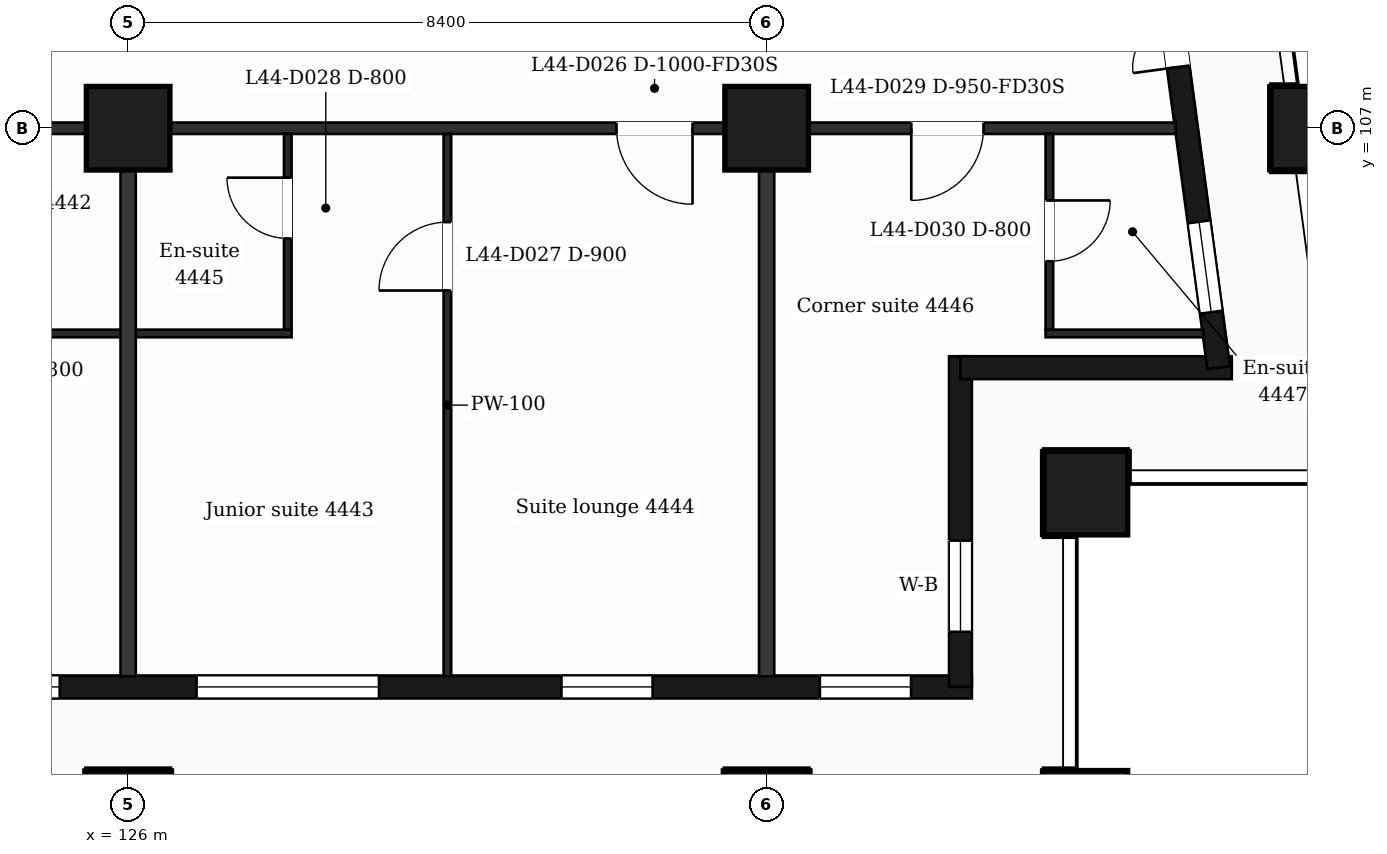
"""IFC4 building model, lengths in metres.
Left out: names, types, materials, properties, quantities, classifications, styles, units other than length and angle.
Written with IfcOpenShell. Run it as: python <this file> out.ifc"""

import sys

from ifc_helpers import new_model, si_unit, direction, frame, frame_2d, origin, origin_2d, place, context, subcontext, project, spatial, rectangle, extrude, element, fill, save


model = new_model("IFC4")
c1 = context("Model", 3, precision=1e-05, world=origin(), true_north=direction((0.0, 1.0)))
c2 = subcontext(c1, "Body", "Model", "MODEL_VIEW")
j1 = project(units=[si_unit("LENGTHUNIT", "METRE"), si_unit("PLANEANGLEUNIT", "RADIAN")], contexts=[c1])
p1 = place(None, origin())
s1 = spatial("IfcSite", under=j1, at=p1, CompositionType="ELEMENT")
p2 = place(p1, origin())
s2 = spatial("IfcBuilding", under=s1, at=p2, CompositionType="ELEMENT")
p3 = place(p2, frame((0.0, 0.0, 184.8)))
s3 = spatial("IfcBuildingStorey", under=s2, at=p3, CompositionType="ELEMENT", Elevation=184.8)
for number, where, z_axis, x_axis in (
    (1, (126.0, 98.0, 0.0), (0.0, 0.0, 1.0), (1.0, 0.0, 0.0)),
    (2, (134.4, 98.0, 0.0), (0.0, 0.0, 1.0), (1.0, 0.0, 0.0)),
    (3, (138.6, 98.0, 0.0), (0.0, 0.0, 1.0), (1.0, 0.0, 0.0)),
    (4, (138.6, 102.2, 0.0), (0.0, 0.0, 1.0), (1.0, 0.0, 0.0)),
    (5, (126.0, 107.0, 0.0), (0.0, 0.0, 1.0), (1.0, 0.0, 0.0)),
    (6, (134.4, 107.0, 0.0), (0.0, 0.0, 1.0), (1.0, 0.0, 0.0)),
    (7, (141.588, 107.0, 0.0), (0.0, 0.0, 1.0), (1.0, 0.0, 0.0)),
):
    element("IfcColumn", number, at=place(p3, frame(where, z_axis=z_axis, x_axis=x_axis)), inside=s3, PredefinedType="COLUMN", context=c2, shape_type="SweptSolid", body=[
        extrude(rectangle(XDim=1.1, YDim=1.1, at=origin_2d()), origin(), (0.0, 0.0, 1.0), 3.7),
    ])
p4 = place(p3, frame((89.85, 99.65, 0.0), z_axis=(0.0, 0.0, 1.0), x_axis=(1.0, 0.0, 0.0)))
e8 = element("IfcWall", 8, at=p4, inside=s3, PredefinedType="SOLIDWALL", context=c2, shape_type="SweptSolid", body=[
    extrude(rectangle(XDim=47.25, YDim=0.3, at=frame_2d((23.625, 0.0))), origin(), (0.0, 0.0, 1.0), 3.38),
])
p5 = place(p4, frame((0.725, 0.0, 0.9)))
e9 = element("IfcOpeningElement", 9, at=p5, cuts=e8, PredefinedType="OPENING", context=c2, shape_type="SweptSolid", body=[
    extrude(rectangle(XDim=1.2, YDim=2.1, at=frame_2d((0.6, 1.05))), frame((0.0, 0.16, 0.0), z_axis=(0.0, -1.0, 0.0), x_axis=(1.0, 0.0, 0.0)), (0.0, 0.0, 1.0), 0.32),
])
p6 = place(p4, frame((3.45, 0.0, 0.9)))
e10 = element("IfcOpeningElement", 10, at=p6, cuts=e8, PredefinedType="OPENING", context=c2, shape_type="SweptSolid", body=[
    extrude(rectangle(XDim=2.4, YDim=2.1, at=frame_2d((1.2, 1.05))), frame((0.0, 0.16, 0.0), z_axis=(0.0, -1.0, 0.0), x_axis=(1.0, 0.0, 0.0)), (0.0, 0.0, 1.0), 0.32),
])
p7 = place(p4, frame((7.65, 0.0, 0.9)))
e11 = element("IfcOpeningElement", 11, at=p7, cuts=e8, PredefinedType="OPENING", context=c2, shape_type="SweptSolid", body=[
    extrude(rectangle(XDim=2.4, YDim=2.1, at=frame_2d((1.2, 1.05))), frame((0.0, 0.16, 0.0), z_axis=(0.0, -1.0, 0.0), x_axis=(1.0, 0.0, 0.0)), (0.0, 0.0, 1.0), 0.32),
])
p8 = place(p4, frame((12.45, 0.0, 0.9)))
e12 = element("IfcOpeningElement", 12, at=p8, cuts=e8, PredefinedType="OPENING", context=c2, shape_type="SweptSolid", body=[
    extrude(rectangle(XDim=1.2, YDim=2.1, at=frame_2d((0.6, 1.05))), frame((0.0, 0.16, 0.0), z_axis=(0.0, -1.0, 0.0), x_axis=(1.0, 0.0, 0.0)), (0.0, 0.0, 1.0), 0.32),
])
p9 = place(p4, frame((16.65, 0.0, 0.9)))
e13 = element("IfcOpeningElement", 13, at=p9, cuts=e8, PredefinedType="OPENING", context=c2, shape_type="SweptSolid", body=[
    extrude(rectangle(XDim=1.2, YDim=2.1, at=frame_2d((0.6, 1.05))), frame((0.0, 0.16, 0.0), z_axis=(0.0, -1.0, 0.0), x_axis=(1.0, 0.0, 0.0)), (0.0, 0.0, 1.0), 0.32),
])
p10 = place(p4, frame((19.95, 0.0, 0.0)))
e14 = element("IfcOpeningElement", 14, at=p10, cuts=e8, PredefinedType="OPENING", context=c2, shape_type="SweptSolid", body=[
    extrude(rectangle(XDim=1.2, YDim=2.4, at=frame_2d((0.6, 1.2))), frame((0.0, 0.16, 0.0), z_axis=(0.0, -1.0, 0.0), x_axis=(1.0, 0.0, 0.0)), (0.0, 0.0, 1.0), 0.32),
])
p11 = place(p4, frame((21.75, 0.0, 0.9)))
e15 = element("IfcOpeningElement", 15, at=p11, cuts=e8, PredefinedType="OPENING", context=c2, shape_type="SweptSolid", body=[
    extrude(rectangle(XDim=1.2, YDim=2.1, at=frame_2d((0.6, 1.05))), frame((0.0, 0.16, 0.0), z_axis=(0.0, -1.0, 0.0), x_axis=(1.0, 0.0, 0.0)), (0.0, 0.0, 1.0), 0.32),
])
p12 = place(p4, frame((24.45, 0.0, 0.9)))
e16 = element("IfcOpeningElement", 16, at=p12, cuts=e8, PredefinedType="OPENING", context=c2, shape_type="SweptSolid", body=[
    extrude(rectangle(XDim=2.4, YDim=2.1, at=frame_2d((1.2, 1.05))), frame((0.0, 0.16, 0.0), z_axis=(0.0, -1.0, 0.0), x_axis=(1.0, 0.0, 0.0)), (0.0, 0.0, 1.0), 0.32),
])
p13 = place(p4, frame((28.35, 0.0, 0.0)))
e17 = element("IfcOpeningElement", 17, at=p13, cuts=e8, PredefinedType="OPENING", context=c2, shape_type="SweptSolid", body=[
    extrude(rectangle(XDim=1.2, YDim=2.4, at=frame_2d((0.6, 1.2))), frame((0.0, 0.16, 0.0), z_axis=(0.0, -1.0, 0.0), x_axis=(1.0, 0.0, 0.0)), (0.0, 0.0, 1.0), 0.32),
])
p14 = place(p4, frame((30.15, 0.0, 0.9)))
e18 = element("IfcOpeningElement", 18, at=p14, cuts=e8, PredefinedType="OPENING", context=c2, shape_type="SweptSolid", body=[
    extrude(rectangle(XDim=1.2, YDim=2.1, at=frame_2d((0.6, 1.05))), frame((0.0, 0.16, 0.0), z_axis=(0.0, -1.0, 0.0), x_axis=(1.0, 0.0, 0.0)), (0.0, 0.0, 1.0), 0.32),
])
p15 = place(p4, frame((32.85, 0.0, 0.9)))
e19 = element("IfcOpeningElement", 19, at=p15, cuts=e8, PredefinedType="OPENING", context=c2, shape_type="SweptSolid", body=[
    extrude(rectangle(XDim=2.4, YDim=2.1, at=frame_2d((1.2, 1.05))), frame((0.0, 0.16, 0.0), z_axis=(0.0, -1.0, 0.0), x_axis=(1.0, 0.0, 0.0)), (0.0, 0.0, 1.0), 0.32),
])
p16 = place(p4, frame((37.05, 0.0, 0.9)))
e20 = element("IfcOpeningElement", 20, at=p16, cuts=e8, PredefinedType="OPENING", context=c2, shape_type="SweptSolid", body=[
    extrude(rectangle(XDim=2.4, YDim=2.1, at=frame_2d((1.2, 1.05))), frame((0.0, 0.16, 0.0), z_axis=(0.0, -1.0, 0.0), x_axis=(1.0, 0.0, 0.0)), (0.0, 0.0, 1.0), 0.32),
])
p17 = place(p4, frame((41.85, 0.0, 0.9)))
e21 = element("IfcOpeningElement", 21, at=p17, cuts=e8, PredefinedType="OPENING", context=c2, shape_type="SweptSolid", body=[
    extrude(rectangle(XDim=1.2, YDim=2.1, at=frame_2d((0.6, 1.05))), frame((0.0, 0.16, 0.0), z_axis=(0.0, -1.0, 0.0), x_axis=(1.0, 0.0, 0.0)), (0.0, 0.0, 1.0), 0.32),
])
p18 = place(p4, frame((45.25, 0.0, 0.9)))
e22 = element("IfcOpeningElement", 22, at=p18, cuts=e8, PredefinedType="OPENING", context=c2, shape_type="SweptSolid", body=[
    extrude(rectangle(XDim=1.2, YDim=2.1, at=frame_2d((0.6, 1.05))), frame((0.0, 0.16, 0.0), z_axis=(0.0, -1.0, 0.0), x_axis=(1.0, 0.0, 0.0)), (0.0, 0.0, 1.0), 0.32),
])
p19 = place(p3, frame((136.95, 99.65, 0.0), z_axis=(0.0, 0.0, 1.0), x_axis=(0.0, 1.0, 0.0)))
e23 = element("IfcWall", 23, at=p19, inside=s3, PredefinedType="SOLIDWALL", context=c2, shape_type="SweptSolid", body=[
    extrude(rectangle(XDim=4.35, YDim=0.3, at=frame_2d((2.175, 0.0))), origin(), (0.0, 0.0, 1.0), 3.38),
])
p20 = place(p19, frame((0.725, 0.0, 0.9)))
e24 = element("IfcOpeningElement", 24, at=p20, cuts=e23, PredefinedType="OPENING", context=c2, shape_type="SweptSolid", body=[
    extrude(rectangle(XDim=1.2, YDim=2.1, at=frame_2d((0.6, 1.05))), frame((0.0, 0.16, 0.0), z_axis=(0.0, -1.0, 0.0), x_axis=(1.0, 0.0, 0.0)), (0.0, 0.0, 1.0), 0.32),
])
p21 = place(p3, frame((136.95, 103.85, 0.0), z_axis=(0.0, 0.0, 1.0), x_axis=(1.0, 0.0, 0.0)))
e25 = element("IfcWall", 25, at=p21, inside=s3, PredefinedType="SOLIDWALL", context=c2, shape_type="SweptSolid", body=[
    extrude(rectangle(XDim=3.569, YDim=0.3, at=frame_2d((1.785, 0.0))), origin(), (0.0, 0.0, 1.0), 3.38),
])
p22 = place(p3, frame((140.348, 103.85, 0.0), z_axis=(0.0, 0.0, 1.0), x_axis=(-0.133431549479, 0.991058031401, 0.0)))
e26 = element("IfcWall", 26, at=p22, inside=s3, PredefinedType="SOLIDWALL", context=c2, shape_type="SweptSolid", body=[
    extrude(rectangle(XDim=6.609, YDim=0.3, at=frame_2d((3.304, 0.0))), origin(), (0.0, 0.0, 1.0), 3.38),
])
p23 = place(p22, frame((0.737, 0.0, 0.9)))
e27 = element("IfcOpeningElement", 27, at=p23, cuts=e26, PredefinedType="OPENING", context=c2, shape_type="SweptSolid", body=[
    extrude(rectangle(XDim=1.2, YDim=2.1, at=frame_2d((0.6, 1.05))), frame((0.0, 0.16, 0.0), z_axis=(0.0, -1.0, 0.0), x_axis=(1.0, 0.0, 0.0)), (0.0, 0.0, 1.0), 0.32),
])
p24 = place(p22, frame((3.991, 0.0, 0.0)))
e28 = element("IfcOpeningElement", 28, at=p24, cuts=e26, PredefinedType="OPENING", context=c2, shape_type="SweptSolid", body=[
    extrude(rectangle(XDim=1.2, YDim=2.4, at=frame_2d((0.6, 1.2))), frame((0.0, 0.16, 0.0), z_axis=(0.0, -1.0, 0.0), x_axis=(1.0, 0.0, 0.0)), (0.0, 0.0, 1.0), 0.32),
])
p25 = place(p3, frame((123.25, 104.3, 0.0), z_axis=(0.0, 0.0, 1.0), x_axis=(1.0, 0.0, 0.0)))
e29 = element("IfcWall", 29, at=p25, inside=s3, PredefinedType="PARTITIONING", context=c2, shape_type="SweptSolid", body=[
    extrude(rectangle(XDim=4.9, YDim=0.1, at=frame_2d((2.45, 0.0))), origin(), (0.0, 0.0, 1.0), 3.38),
])
p26 = place(p25, frame((0.7, 0.0, 0.0)))
e30 = element("IfcOpeningElement", 30, at=p26, cuts=e29, PredefinedType="OPENING", context=c2, shape_type="SweptSolid", body=[
    extrude(rectangle(XDim=0.8, YDim=2.1, at=frame_2d((0.4, 1.05))), frame((0.0, 0.06, 0.0), z_axis=(0.0, -1.0, 0.0), x_axis=(1.0, 0.0, 0.0)), (0.0, 0.0, 1.0), 0.12),
])
p27 = place(p3, frame((138.07, 104.3, 0.0), z_axis=(0.0, 0.0, 1.0), x_axis=(1.0, 0.0, 0.0)))
e31 = element("IfcWall", 31, at=p27, inside=s3, PredefinedType="PARTITIONING", context=c2, shape_type="SweptSolid", body=[
    extrude(rectangle(XDim=2.076, YDim=0.1, at=frame_2d((1.038, 0.0))), origin(), (0.0, 0.0, 1.0), 3.38),
])
p28 = place(p3, frame((87.018, 107.0, 0.0), z_axis=(0.0, 0.0, 1.0), x_axis=(1.0, 0.0, 0.0)))
e32 = element("IfcWall", 32, at=p28, inside=s3, PredefinedType="PARTITIONING", context=c2, shape_type="SweptSolid", body=[
    extrude(rectangle(XDim=52.765, YDim=0.15, at=frame_2d((26.382, 0.0))), origin(), (0.0, 0.0, 1.0), 3.38),
])
p29 = place(p28, frame((0.87, 0.0, 0.0)))
e33 = element("IfcOpeningElement", 33, at=p29, cuts=e32, PredefinedType="OPENING", context=c2, shape_type="SweptSolid", body=[
    extrude(rectangle(XDim=0.95, YDim=2.1, at=frame_2d((0.475, 1.05))), frame((0.0, 0.085, 0.0), z_axis=(0.0, -1.0, 0.0), x_axis=(1.0, 0.0, 0.0)), (0.0, 0.0, 1.0), 0.17),
])
p30 = place(p28, frame((10.757, 0.0, 0.0)))
e34 = element("IfcOpeningElement", 34, at=p30, cuts=e32, PredefinedType="OPENING", context=c2, shape_type="SweptSolid", body=[
    extrude(rectangle(XDim=1.0, YDim=2.1, at=frame_2d((0.5, 1.05))), frame((0.0, 0.085, 0.0), z_axis=(0.0, -1.0, 0.0), x_axis=(1.0, 0.0, 0.0)), (0.0, 0.0, 1.0), 0.17),
])
p31 = place(p28, frame((20.432, 0.0, 0.0)))
e35 = element("IfcOpeningElement", 35, at=p31, cuts=e32, PredefinedType="OPENING", context=c2, shape_type="SweptSolid", body=[
    extrude(rectangle(XDim=0.95, YDim=2.1, at=frame_2d((0.475, 1.05))), frame((0.0, 0.085, 0.0), z_axis=(0.0, -1.0, 0.0), x_axis=(1.0, 0.0, 0.0)), (0.0, 0.0, 1.0), 0.17),
])
p32 = place(p28, frame((27.752, 0.0, 0.0)))
e36 = element("IfcOpeningElement", 36, at=p32, cuts=e32, PredefinedType="OPENING", context=c2, shape_type="SweptSolid", body=[
    extrude(rectangle(XDim=0.95, YDim=2.1, at=frame_2d((0.475, 1.05))), frame((0.0, 0.085, 0.0), z_axis=(0.0, -1.0, 0.0), x_axis=(1.0, 0.0, 0.0)), (0.0, 0.0, 1.0), 0.17),
])
p33 = place(p28, frame((33.557, 0.0, 0.0)))
e37 = element("IfcOpeningElement", 37, at=p33, cuts=e32, PredefinedType="OPENING", context=c2, shape_type="SweptSolid", body=[
    extrude(rectangle(XDim=0.95, YDim=2.1, at=frame_2d((0.475, 1.05))), frame((0.0, 0.085, 0.0), z_axis=(0.0, -1.0, 0.0), x_axis=(1.0, 0.0, 0.0)), (0.0, 0.0, 1.0), 0.17),
])
p34 = place(p28, frame((35.057, 0.0, 0.0)))
e38 = element("IfcOpeningElement", 38, at=p34, cuts=e32, PredefinedType="OPENING", context=c2, shape_type="SweptSolid", body=[
    extrude(rectangle(XDim=0.95, YDim=2.1, at=frame_2d((0.475, 1.05))), frame((0.0, 0.085, 0.0), z_axis=(0.0, -1.0, 0.0), x_axis=(1.0, 0.0, 0.0)), (0.0, 0.0, 1.0), 0.17),
])
p35 = place(p28, frame((45.407, 0.0, 0.0)))
e39 = element("IfcOpeningElement", 39, at=p35, cuts=e32, PredefinedType="OPENING", context=c2, shape_type="SweptSolid", body=[
    extrude(rectangle(XDim=1.0, YDim=2.1, at=frame_2d((0.5, 1.05))), frame((0.0, 0.085, 0.0), z_axis=(0.0, -1.0, 0.0), x_axis=(1.0, 0.0, 0.0)), (0.0, 0.0, 1.0), 0.17),
])
p36 = place(p28, frame((49.285, 0.0, 0.0)))
e40 = element("IfcOpeningElement", 40, at=p36, cuts=e32, PredefinedType="OPENING", context=c2, shape_type="SweptSolid", body=[
    extrude(rectangle(XDim=0.95, YDim=2.1, at=frame_2d((0.475, 1.05))), frame((0.0, 0.085, 0.0), z_axis=(0.0, -1.0, 0.0), x_axis=(1.0, 0.0, 0.0)), (0.0, 0.0, 1.0), 0.17),
])
p37 = place(p3, frame((126.0, 99.79, 0.0), z_axis=(0.0, 0.0, 1.0), x_axis=(0.0, 1.0, 0.0)))
e41 = element("IfcWall", 41, at=p37, inside=s3, PredefinedType="PARTITIONING", context=c2, shape_type="SweptSolid", body=[
    extrude(rectangle(XDim=7.135, YDim=0.2, at=frame_2d((3.567, 0.0))), origin(), (0.0, 0.0, 1.0), 3.38),
])
p38 = place(p3, frame((128.1, 104.35, 0.0), z_axis=(0.0, 0.0, 1.0), x_axis=(0.0, 1.0, 0.0)))
e42 = element("IfcWall", 42, at=p38, inside=s3, PredefinedType="PARTITIONING", context=c2, shape_type="SweptSolid", body=[
    extrude(rectangle(XDim=2.575, YDim=0.1, at=frame_2d((1.288, 0.0))), origin(), (0.0, 0.0, 1.0), 3.38),
])
p39 = place(p38, frame((1.2, 0.0, 0.0)))
e43 = element("IfcOpeningElement", 43, at=p39, cuts=e42, PredefinedType="OPENING", context=c2, shape_type="SweptSolid", body=[
    extrude(rectangle(XDim=0.8, YDim=2.1, at=frame_2d((0.4, 1.05))), frame((0.0, 0.06, 0.0), z_axis=(0.0, -1.0, 0.0), x_axis=(1.0, 0.0, 0.0)), (0.0, 0.0, 1.0), 0.12),
])
p40 = place(p3, frame((130.2, 99.79, 0.0), z_axis=(0.0, 0.0, 1.0), x_axis=(0.0, 1.0, 0.0)))
e44 = element("IfcWall", 44, at=p40, inside=s3, PredefinedType="PARTITIONING", context=c2, shape_type="SweptSolid", body=[
    extrude(rectangle(XDim=7.135, YDim=0.1, at=frame_2d((3.567, 0.0))), origin(), (0.0, 0.0, 1.0), 3.38),
])
p41 = place(p40, frame((5.075, 0.0, 0.0)))
e45 = element("IfcOpeningElement", 45, at=p41, cuts=e44, PredefinedType="OPENING", context=c2, shape_type="SweptSolid", body=[
    extrude(rectangle(XDim=0.9, YDim=2.1, at=frame_2d((0.45, 1.05))), frame((0.0, 0.06, 0.0), z_axis=(0.0, -1.0, 0.0), x_axis=(1.0, 0.0, 0.0)), (0.0, 0.0, 1.0), 0.12),
])
p42 = place(p3, frame((134.4, 99.79, 0.0), z_axis=(0.0, 0.0, 1.0), x_axis=(0.0, 1.0, 0.0)))
e46 = element("IfcWall", 46, at=p42, inside=s3, PredefinedType="PARTITIONING", context=c2, shape_type="SweptSolid", body=[
    extrude(rectangle(XDim=7.135, YDim=0.2, at=frame_2d((3.567, 0.0))), origin(), (0.0, 0.0, 1.0), 3.38),
])
p43 = place(p3, frame((138.12, 104.35, 0.0), z_axis=(0.0, 0.0, 1.0), x_axis=(0.0, 1.0, 0.0)))
e47 = element("IfcWall", 47, at=p43, inside=s3, PredefinedType="PARTITIONING", context=c2, shape_type="SweptSolid", body=[
    extrude(rectangle(XDim=2.575, YDim=0.1, at=frame_2d((1.288, 0.0))), origin(), (0.0, 0.0, 1.0), 3.38),
])
p44 = place(p43, frame((0.9, 0.0, 0.0)))
e48 = element("IfcOpeningElement", 48, at=p44, cuts=e47, PredefinedType="OPENING", context=c2, shape_type="SweptSolid", body=[
    extrude(rectangle(XDim=0.8, YDim=2.1, at=frame_2d((0.4, 1.05))), frame((0.0, 0.06, 0.0), z_axis=(0.0, -1.0, 0.0), x_axis=(1.0, 0.0, 0.0)), (0.0, 0.0, 1.0), 0.12),
])
p45 = place(p15, origin())
e49 = element("IfcWindow", 49, at=p45, inside=s3, PartitioningType="SINGLE_PANEL", PredefinedType="WINDOW", context=c2, shape_type="SweptSolid", body=[
    extrude(rectangle(XDim=2.4, YDim=2.1, at=frame_2d((1.2, 1.05))), frame((0.0, 0.03, 0.0), z_axis=(0.0, -1.0, 0.0), x_axis=(1.0, 0.0, 0.0)), (0.0, 0.0, 1.0), 0.06),
])
fill(e19, e49)
p46 = place(p16, origin())
e50 = element("IfcWindow", 50, at=p46, inside=s3, PartitioningType="SINGLE_PANEL", PredefinedType="WINDOW", context=c2, shape_type="SweptSolid", body=[
    extrude(rectangle(XDim=2.4, YDim=2.1, at=frame_2d((1.2, 1.05))), frame((0.0, 0.03, 0.0), z_axis=(0.0, -1.0, 0.0), x_axis=(1.0, 0.0, 0.0)), (0.0, 0.0, 1.0), 0.06),
])
fill(e20, e50)
p47 = place(p17, origin())
e51 = element("IfcWindow", 51, at=p47, inside=s3, PartitioningType="SINGLE_PANEL", PredefinedType="WINDOW", context=c2, shape_type="SweptSolid", body=[
    extrude(rectangle(XDim=1.2, YDim=2.1, at=frame_2d((0.6, 1.05))), frame((0.0, 0.03, 0.0), z_axis=(0.0, -1.0, 0.0), x_axis=(1.0, 0.0, 0.0)), (0.0, 0.0, 1.0), 0.06),
])
fill(e21, e51)
p48 = place(p18, origin())
e52 = element("IfcWindow", 52, at=p48, inside=s3, PartitioningType="SINGLE_PANEL", PredefinedType="WINDOW", context=c2, shape_type="SweptSolid", body=[
    extrude(rectangle(XDim=1.2, YDim=2.1, at=frame_2d((0.6, 1.05))), frame((0.0, 0.03, 0.0), z_axis=(0.0, -1.0, 0.0), x_axis=(1.0, 0.0, 0.0)), (0.0, 0.0, 1.0), 0.06),
])
fill(e22, e52)
p49 = place(p20, origin())
e53 = element("IfcWindow", 53, at=p49, inside=s3, PartitioningType="SINGLE_PANEL", PredefinedType="WINDOW", context=c2, shape_type="SweptSolid", body=[
    extrude(rectangle(XDim=1.2, YDim=2.1, at=frame_2d((0.6, 1.05))), frame((0.0, 0.03, 0.0), z_axis=(0.0, -1.0, 0.0), x_axis=(1.0, 0.0, 0.0)), (0.0, 0.0, 1.0), 0.06),
])
fill(e24, e53)
p50 = place(p23, origin())
e54 = element("IfcWindow", 54, at=p50, inside=s3, PartitioningType="SINGLE_PANEL", PredefinedType="WINDOW", context=c2, shape_type="SweptSolid", body=[
    extrude(rectangle(XDim=1.2, YDim=2.1, at=frame_2d((0.6, 1.05))), frame((0.0, 0.03, 0.0), z_axis=(0.0, -1.0, 0.0), x_axis=(1.0, 0.0, 0.0)), (0.0, 0.0, 1.0), 0.06),
])
fill(e27, e54)
p51 = place(p24, origin())
e55 = element("IfcDoor", 55, at=p51, inside=s3, OperationType="DOUBLE_DOOR_SINGLE_SWING", PredefinedType="DOOR", context=c2, shape_type="SweptSolid", body=[
    extrude(rectangle(XDim=1.2, YDim=2.4, at=frame_2d((0.6, 1.2))), frame((0.0, 0.025, 0.0), z_axis=(0.0, -1.0, 0.0), x_axis=(1.0, 0.0, 0.0)), (0.0, 0.0, 1.0), 0.05),
])
fill(e28, e55)
p52 = place(p35, origin())
e56 = element("IfcDoor", 56, at=p52, inside=s3, OperationType="SINGLE_SWING_RIGHT", PredefinedType="DOOR", context=c2, shape_type="SweptSolid", body=[
    extrude(rectangle(XDim=1.0, YDim=2.1, at=frame_2d((0.5, 1.05))), frame((0.0, 0.025, 0.0), z_axis=(0.0, -1.0, 0.0), x_axis=(1.0, 0.0, 0.0)), (0.0, 0.0, 1.0), 0.05),
])
fill(e39, e56)
p53 = place(p41, origin())
e57 = element("IfcDoor", 57, at=p53, inside=s3, OperationType="SINGLE_SWING_LEFT", PredefinedType="DOOR", context=c2, shape_type="SweptSolid", body=[
    extrude(rectangle(XDim=0.9, YDim=2.1, at=frame_2d((0.45, 1.05))), frame((0.0, 0.025, 0.0), z_axis=(0.0, -1.0, 0.0), x_axis=(1.0, 0.0, 0.0)), (0.0, 0.0, 1.0), 0.05),
])
fill(e45, e57)
p54 = place(p39, origin())
e58 = element("IfcDoor", 58, at=p54, inside=s3, OperationType="SINGLE_SWING_RIGHT", PredefinedType="DOOR", context=c2, shape_type="SweptSolid", body=[
    extrude(rectangle(XDim=0.8, YDim=2.1, at=frame_2d((0.4, 1.05))), frame((0.0, 0.025, 0.0), z_axis=(0.0, -1.0, 0.0), x_axis=(1.0, 0.0, 0.0)), (0.0, 0.0, 1.0), 0.05),
])
fill(e43, e58)
p55 = place(p36, origin())
e59 = element("IfcDoor", 59, at=p55, inside=s3, OperationType="SINGLE_SWING_LEFT", PredefinedType="DOOR", context=c2, shape_type="SweptSolid", body=[
    extrude(rectangle(XDim=0.95, YDim=2.1, at=frame_2d((0.475, 1.05))), frame((0.0, 0.025, 0.0), z_axis=(0.0, -1.0, 0.0), x_axis=(1.0, 0.0, 0.0)), (0.0, 0.0, 1.0), 0.05),
])
fill(e40, e59)
p56 = place(p44, origin())
e60 = element("IfcDoor", 60, at=p56, inside=s3, OperationType="SINGLE_SWING_RIGHT", PredefinedType="DOOR", context=c2, shape_type="SweptSolid", body=[
    extrude(rectangle(XDim=0.8, YDim=2.1, at=frame_2d((0.4, 1.05))), frame((0.0, 0.025, 0.0), z_axis=(0.0, -1.0, 0.0), x_axis=(1.0, 0.0, 0.0)), (0.0, 0.0, 1.0), 0.05),
])
fill(e48, e60)
save(model, sys.argv[1])
